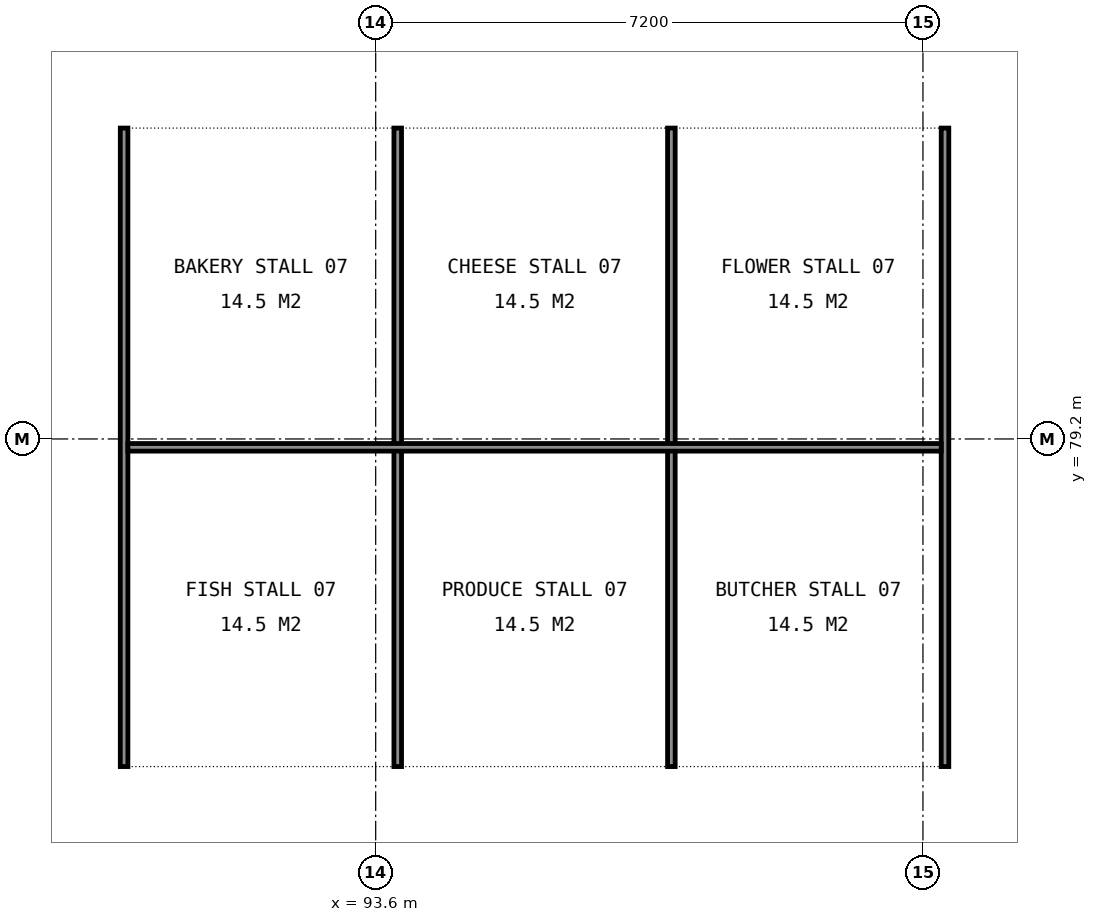
"""IFC4 building model, lengths in metres.
Left out: names, types, materials, properties, quantities, classifications, styles, units other than length and angle.
Written with IfcOpenShell. Run it as: python <this file> out.ifc"""

import sys

from ifc_helpers import new_model, si_unit, direction, frame, frame_2d, origin, place, context, subcontext, project, spatial, rectangle, extrude, element, save


model = new_model("IFC4")
c1 = context("Model", 3, precision=1e-05, world=origin(), true_north=direction((0.0, 1.0)))
c2 = subcontext(c1, "Body", "Model", "MODEL_VIEW")
j1 = project(units=[si_unit("LENGTHUNIT", "METRE"), si_unit("PLANEANGLEUNIT", "RADIAN")], contexts=[c1])
p1 = place(None, origin())
s1 = spatial("IfcSite", under=j1, at=p1, CompositionType="ELEMENT")
p2 = place(p1, origin())
s2 = spatial("IfcBuilding", under=s1, at=p2, CompositionType="ELEMENT")
p3 = place(p2, origin())
s3 = spatial("IfcBuildingStorey", under=s2, at=p3, CompositionType="ELEMENT", Elevation=0.0)
for number, where, z_axis, x_axis in (
    (1, (90.29, 74.89, 0.0), (0.0, 0.0, 1.0), (0.0, 1.0, 0.0)),
    (2, (93.89, 74.89, 0.0), (0.0, 0.0, 1.0), (0.0, 1.0, 0.0)),
    (3, (97.49, 74.89, 0.0), (0.0, 0.0, 1.0), (0.0, 1.0, 0.0)),
    (4, (101.09, 74.89, 0.0), (0.0, 0.0, 1.0), (0.0, 1.0, 0.0)),
):
    element("IfcWall", number, at=place(p3, frame(where, z_axis=z_axis, x_axis=x_axis)), inside=s3, PredefinedType="PARTITIONING", context=c2, shape_type="SweptSolid", body=[
        extrude(rectangle(XDim=8.4, YDim=0.1, at=frame_2d((4.2, 0.0))), origin(), (0.0, 0.0, 1.0), 1.2),
    ])
p4 = place(p3, frame((90.34, 79.09, 0.0), z_axis=(0.0, 0.0, 1.0), x_axis=(1.0, 0.0, 0.0)))
e5 = element("IfcWall", 5, at=p4, inside=s3, PredefinedType="PARTITIONING", context=c2, shape_type="SweptSolid", body=[
    extrude(rectangle(XDim=10.7, YDim=0.1, at=frame_2d((5.35, 0.0))), origin(), (0.0, 0.0, 1.0), 1.2),
])
save(model, sys.argv[1])
